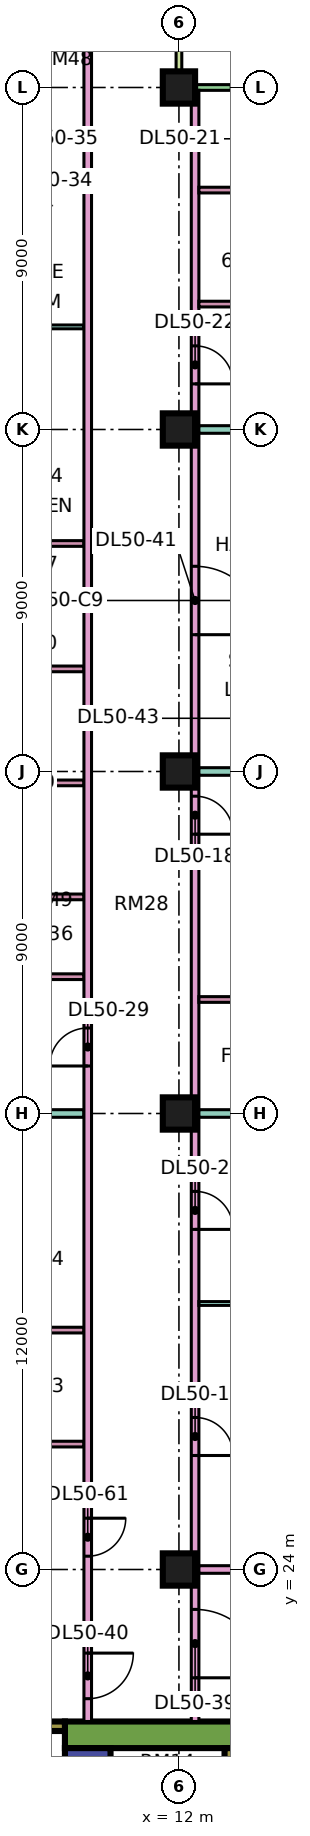
"""IFC4 building model, lengths in metres.
Left out: names, types, materials, properties, quantities, classifications, styles, units other than length and angle.
Written with IfcOpenShell. Run it as: python <this file> out.ifc"""

import sys

from ifc_helpers import new_model, si_unit, direction, frame, frame_2d, origin, origin_2d, place, context, subcontext, project, spatial, rectangle, extrude, element, fill, save


model = new_model("IFC4")
c1 = context("Model", 3, precision=1e-05, world=origin(), true_north=direction((0.0, 1.0)))
c2 = subcontext(c1, "Body", "Model", "MODEL_VIEW")
j1 = project(units=[si_unit("LENGTHUNIT", "METRE"), si_unit("PLANEANGLEUNIT", "RADIAN")], contexts=[c1])
p1 = place(None, origin())
s1 = spatial("IfcSite", under=j1, at=p1, CompositionType="ELEMENT")
p2 = place(p1, origin())
s2 = spatial("IfcBuilding", under=s1, at=p2, CompositionType="ELEMENT")
p3 = place(p2, frame((0.0, 0.0, 215.4)))
s3 = spatial("IfcBuildingStorey", under=s2, at=p3, CompositionType="ELEMENT", Elevation=215.4)
for number, where, z_axis, x_axis in (
    (1, (12.0, 24.0, 0.0), (0.0, 0.0, 1.0), (1.0, 0.0, 0.0)),
    (2, (12.0, 36.0, 0.0), (0.0, 0.0, 1.0), (1.0, 0.0, 0.0)),
    (3, (12.0, 45.0, 0.0), (0.0, 0.0, 1.0), (1.0, 0.0, 0.0)),
    (4, (12.0, 54.0, 0.0), (0.0, 0.0, 1.0), (1.0, 0.0, 0.0)),
    (5, (12.0, 63.0, 0.0), (0.0, 0.0, 1.0), (1.0, 0.0, 0.0)),
):
    element("IfcColumn", number, at=place(p3, frame(where, z_axis=z_axis, x_axis=x_axis)), inside=s3, PredefinedType="COLUMN", context=c2, shape_type="SweptSolid", body=[
        extrude(rectangle(XDim=0.85, YDim=0.85, at=origin_2d()), origin(), (0.0, 0.0, 1.0), 3.75),
    ])
p4 = place(p3, frame((9.0, 19.65, 0.0), z_axis=(0.0, 0.0, 1.0), x_axis=(1.0, 0.0, 0.0)))
e6 = element("IfcWall", 6, at=p4, inside=s3, PredefinedType="SHEAR", context=c2, shape_type="SweptSolid", body=[
    extrude(rectangle(XDim=25.0, YDim=0.7, at=frame_2d((12.5, 0.0))), origin(), (0.0, 0.0, 1.0), 3.75),
])
p5 = place(p4, frame((19.1, 0.0, 0.0)))
e7 = element("IfcOpeningElement", 7, at=p5, cuts=e6, PredefinedType="OPENING", context=c2, shape_type="SweptSolid", body=[
    extrude(rectangle(XDim=1.8, YDim=2.4, at=frame_2d((0.9, 1.2))), frame((0.0, 0.36, 0.0), z_axis=(0.0, -1.0, 0.0), x_axis=(1.0, 0.0, 0.0)), (0.0, 0.0, 1.0), 0.72),
])
p6 = place(p3, frame((9.6, 7.7, 0.0), z_axis=(0.0, 0.0, 1.0), x_axis=(0.0, 1.0, 0.0)))
e8 = element("IfcWall", 8, at=p6, inside=s3, PredefinedType="SHEAR", context=c2, shape_type="SweptSolid", body=[
    extrude(rectangle(XDim=11.6, YDim=1.2, at=frame_2d((5.8, 0.0))), origin(), (0.0, 0.0, 1.0), 3.75),
])
p7 = place(p6, frame((4.175, 0.0, 0.0)))
e9 = element("IfcOpeningElement", 9, at=p7, cuts=e8, PredefinedType="OPENING", context=c2, shape_type="SweptSolid", body=[
    extrude(rectangle(XDim=1.1, YDim=2.2, at=frame_2d((0.55, 1.1))), frame((0.0, 0.61, 0.0), z_axis=(0.0, -1.0, 0.0), x_axis=(1.0, 0.0, 0.0)), (0.0, 0.0, 1.0), 1.22),
])
p8 = place(p6, frame((6.675, 0.0, 0.0)))
e10 = element("IfcOpeningElement", 10, at=p8, cuts=e8, PredefinedType="OPENING", context=c2, shape_type="SweptSolid", body=[
    extrude(rectangle(XDim=1.1, YDim=2.2, at=frame_2d((0.55, 1.1))), frame((0.0, 0.61, 0.0), z_axis=(0.0, -1.0, 0.0), x_axis=(1.0, 0.0, 0.0)), (0.0, 0.0, 1.0), 1.22),
])
p9 = place(p6, frame((9.55, 0.0, 0.0)))
e11 = element("IfcOpeningElement", 11, at=p9, cuts=e8, PredefinedType="OPENING", context=c2, shape_type="SweptSolid", body=[
    extrude(rectangle(XDim=1.1, YDim=2.2, at=frame_2d((0.55, 1.1))), frame((0.0, 0.61, 0.0), z_axis=(0.0, -1.0, 0.0), x_axis=(1.0, 0.0, 0.0)), (0.0, 0.0, 1.0), 1.22),
])
p10 = place(p6, frame((1.85, 0.0, 0.0)))
e12 = element("IfcOpeningElement", 12, at=p10, cuts=e8, PredefinedType="OPENING", context=c2, shape_type="SweptSolid", body=[
    extrude(rectangle(XDim=0.9, YDim=2.1, at=frame_2d((0.45, 1.05))), frame((0.0, 0.61, 0.0), z_axis=(0.0, -1.0, 0.0), x_axis=(1.0, 0.0, 0.0)), (0.0, 0.0, 1.0), 1.22),
])
p11 = place(p3, frame((13.325, 7.7, 0.0), z_axis=(0.0, 0.0, 1.0), x_axis=(0.0, 1.0, 0.0)))
e13 = element("IfcWall", 13, at=p11, inside=s3, PredefinedType="SHEAR", context=c2, shape_type="SweptSolid", body=[
    extrude(rectangle(XDim=11.6, YDim=0.25, at=frame_2d((5.8, 0.0))), origin(), (0.0, 0.0, 1.0), 3.75),
])
p12 = place(p3, frame((2.1, 19.875, 0.0), z_axis=(0.0, 0.0, 1.0), x_axis=(1.0, 0.0, 0.0)))
e14 = element("IfcWall", 14, at=p12, inside=s3, PredefinedType="SHEAR", context=c2, shape_type="SweptSolid", body=[
    extrude(rectangle(XDim=6.9, YDim=0.25, at=frame_2d((3.45, 0.0))), origin(), (0.0, 0.0, 1.0), 3.75),
])
p13 = place(p12, frame((1.175, 0.0, 0.0)))
e15 = element("IfcOpeningElement", 15, at=p13, cuts=e14, PredefinedType="OPENING", context=c2, shape_type="SweptSolid", body=[
    extrude(rectangle(XDim=1.1, YDim=2.2, at=frame_2d((0.55, 1.1))), frame((0.0, 0.135, 0.0), z_axis=(0.0, -1.0, 0.0), x_axis=(1.0, 0.0, 0.0)), (0.0, 0.0, 1.0), 0.27),
])
p14 = place(p12, frame((4.6, 0.0, 0.0)))
e16 = element("IfcOpeningElement", 16, at=p14, cuts=e14, PredefinedType="OPENING", context=c2, shape_type="SweptSolid", body=[
    extrude(rectangle(XDim=1.2, YDim=2.2, at=frame_2d((0.6, 1.1))), frame((0.0, 0.135, 0.0), z_axis=(0.0, -1.0, 0.0), x_axis=(1.0, 0.0, 0.0)), (0.0, 0.0, 1.0), 0.27),
])
p15 = place(p3, frame((22.425, 63.0, 0.0), z_axis=(0.0, 0.0, 1.0), x_axis=(-1.0, 0.0, 0.0)))
e17 = element("IfcWall", 17, at=p15, inside=s3, PredefinedType="SOLIDWALL", context=c2, shape_type="SweptSolid", body=[
    extrude(rectangle(XDim=10.35, YDim=0.15, at=frame_2d((5.175, 0.0))), origin(), (0.0, 0.0, 1.0), 3.35),
])
p16 = place(p15, frame((1.1, 0.0, 0.0)))
e18 = element("IfcOpeningElement", 18, at=p16, cuts=e17, PredefinedType="OPENING", context=c2, shape_type="SweptSolid", body=[
    extrude(rectangle(XDim=1.8, YDim=2.4, at=frame_2d((0.9, 1.2))), frame((0.0, 0.085, 0.0), z_axis=(0.0, -1.0, 0.0), x_axis=(1.0, 0.0, 0.0)), (0.0, 0.0, 1.0), 0.17),
])
p17 = place(p15, frame((6.05, 0.0, 0.45)))
e19 = element("IfcOpeningElement", 19, at=p17, cuts=e17, PredefinedType="OPENING", context=c2, shape_type="SweptSolid", body=[
    extrude(rectangle(XDim=3.0, YDim=2.4, at=frame_2d((1.5, 1.2))), frame((0.0, 0.085, 0.0), z_axis=(0.0, -1.0, 0.0), x_axis=(1.0, 0.0, 0.0)), (0.0, 0.0, 1.0), 0.17),
])
p18 = place(p3, frame((12.0, 64.5, 0.0), z_axis=(0.0, 0.0, 1.0), x_axis=(0.0, -1.0, 0.0)))
e20 = element("IfcWall", 20, at=p18, inside=s3, PredefinedType="SOLIDWALL", context=c2, shape_type="SweptSolid", body=[
    extrude(rectangle(XDim=1.5, YDim=0.15, at=frame_2d((0.75, 0.0))), origin(), (0.0, 0.0, 1.0), 3.35),
])
p19 = place(p3, frame((0.074, 22.4, 0.0), z_axis=(0.0, 0.0, 1.0), x_axis=(1.0, 0.0, 0.0)))
e21 = element("IfcWall", 21, at=p19, inside=s3, PredefinedType="PARTITIONING", context=c2, shape_type="SweptSolid", body=[
    extrude(rectangle(XDim=9.426, YDim=0.2, at=frame_2d((4.713, 0.0))), origin(), (0.0, 0.0, 1.0), 3.35),
])
p20 = place(p3, frame((5.65, 36.0, 0.0), z_axis=(0.0, 0.0, 1.0), x_axis=(1.0, 0.0, 0.0)))
e22 = element("IfcWall", 22, at=p20, inside=s3, PredefinedType="PARTITIONING", context=c2, shape_type="SweptSolid", body=[
    extrude(rectangle(XDim=3.85, YDim=0.2, at=frame_2d((1.925, 0.0))), origin(), (0.0, 0.0, 1.0), 3.35),
])
p21 = place(p3, frame((6.675, 39.6, 0.0), z_axis=(0.0, 0.0, 1.0), x_axis=(1.0, 0.0, 0.0)))
e23 = element("IfcWall", 23, at=p21, inside=s3, PredefinedType="PARTITIONING", context=c2, shape_type="SweptSolid", body=[
    extrude(rectangle(XDim=2.825, YDim=0.15, at=frame_2d((1.413, 0.0))), origin(), (0.0, 0.0, 1.0), 3.35),
])
p22 = place(p21, frame((1.075, 0.0, 0.0)))
e24 = element("IfcOpeningElement", 24, at=p22, cuts=e23, PredefinedType="OPENING", context=c2, shape_type="SweptSolid", body=[
    extrude(rectangle(XDim=0.8, YDim=2.1, at=frame_2d((0.4, 1.05))), frame((0.0, 0.085, 0.0), z_axis=(0.0, -1.0, 0.0), x_axis=(1.0, 0.0, 0.0)), (0.0, 0.0, 1.0), 0.17),
])
for number, where, z_axis, x_axis in (
    (25, (6.675, 41.7, 0.0), (0.0, 0.0, 1.0), (1.0, 0.0, 0.0)),
    (26, (6.675, 44.7, 0.0), (0.0, 0.0, 1.0), (1.0, 0.0, 0.0)),
    (27, (6.675, 47.7, 0.0), (0.0, 0.0, 1.0), (1.0, 0.0, 0.0)),
    (28, (6.675, 51.0, 0.0), (0.0, 0.0, 1.0), (1.0, 0.0, 0.0)),
):
    element("IfcWall", number, at=place(p3, frame(where, z_axis=z_axis, x_axis=x_axis)), inside=s3, PredefinedType="PARTITIONING", context=c2, shape_type="SweptSolid", body=[
        extrude(rectangle(XDim=2.825, YDim=0.15, at=frame_2d((1.413, 0.0))), origin(), (0.0, 0.0, 1.0), 3.35),
    ])
for number, where, z_axis, x_axis in (
    (29, (6.675, 56.7, 0.0), (0.0, 0.0, 1.0), (1.0, 0.0, 0.0)),
    (30, (6.675, 60.3, 0.0), (0.0, 0.0, 1.0), (1.0, 0.0, 0.0)),
):
    element("IfcWall", number, at=place(p3, frame(where, z_axis=z_axis, x_axis=x_axis)), inside=s3, PredefinedType="PARTITIONING", context=c2, shape_type="SweptSolid", body=[
        extrude(rectangle(XDim=2.825, YDim=0.1, at=frame_2d((1.413, 0.0))), origin(), (0.0, 0.0, 1.0), 3.35),
    ])
for number, where, z_axis, x_axis in (
    (31, (6.975, 27.3, 0.0), (0.0, 0.0, 1.0), (1.0, 0.0, 0.0)),
    (32, (6.975, 30.3, 0.0), (0.0, 0.0, 1.0), (1.0, 0.0, 0.0)),
):
    element("IfcWall", number, at=place(p3, frame(where, z_axis=z_axis, x_axis=x_axis)), inside=s3, PredefinedType="PARTITIONING", context=c2, shape_type="SweptSolid", body=[
        extrude(rectangle(XDim=2.525, YDim=0.15, at=frame_2d((1.262, 0.0))), origin(), (0.0, 0.0, 1.0), 3.35),
    ])
p23 = place(p3, frame((9.6, 20.0, 0.0), z_axis=(0.0, 0.0, 1.0), x_axis=(0.0, 1.0, 0.0)))
e33 = element("IfcWall", 33, at=p23, inside=s3, PredefinedType="PARTITIONING", context=c2, shape_type="SweptSolid", body=[
    extrude(rectangle(XDim=44.35, YDim=0.2, at=frame_2d((22.175, 0.0))), origin(), (0.0, 0.0, 1.0), 3.35),
])
p24 = place(p23, frame((17.25, 0.0, 0.0)))
e34 = element("IfcOpeningElement", 34, at=p24, cuts=e33, PredefinedType="OPENING", context=c2, shape_type="SweptSolid", body=[
    extrude(rectangle(XDim=1.0, YDim=2.1, at=frame_2d((0.5, 1.05))), frame((0.0, 0.11, 0.0), z_axis=(0.0, -1.0, 0.0), x_axis=(1.0, 0.0, 0.0)), (0.0, 0.0, 1.0), 0.22),
])
p25 = place(p23, frame((0.6, 0.0, 0.0)))
e35 = element("IfcOpeningElement", 35, at=p25, cuts=e33, PredefinedType="OPENING", context=c2, shape_type="SweptSolid", body=[
    extrude(rectangle(XDim=1.2, YDim=2.1, at=frame_2d((0.6, 1.05))), frame((0.0, 0.11, 0.0), z_axis=(0.0, -1.0, 0.0), x_axis=(1.0, 0.0, 0.0)), (0.0, 0.0, 1.0), 0.22),
])
p26 = place(p23, frame((4.35, 0.0, 0.0)))
e36 = element("IfcOpeningElement", 36, at=p26, cuts=e33, PredefinedType="OPENING", context=c2, shape_type="SweptSolid", body=[
    extrude(rectangle(XDim=1.0, YDim=2.1, at=frame_2d((0.5, 1.05))), frame((0.0, 0.11, 0.0), z_axis=(0.0, -1.0, 0.0), x_axis=(1.0, 0.0, 0.0)), (0.0, 0.0, 1.0), 0.22),
])
p27 = place(p3, frame((12.425, 20.0, 0.0), z_axis=(0.0, 0.0, 1.0), x_axis=(0.0, 1.0, 0.0)))
e37 = element("IfcWall", 37, at=p27, inside=s3, PredefinedType="PARTITIONING", context=c2, shape_type="SweptSolid", body=[
    extrude(rectangle(XDim=42.926, YDim=0.2, at=frame_2d((21.463, 0.0))), origin(), (0.0, 0.0, 1.0), 3.35),
])
p28 = place(p27, frame((7.0, 0.0, 0.0)))
e38 = element("IfcOpeningElement", 38, at=p28, cuts=e37, PredefinedType="OPENING", context=c2, shape_type="SweptSolid", body=[
    extrude(rectangle(XDim=1.0, YDim=2.1, at=frame_2d((0.5, 1.05))), frame((0.0, 0.11, 0.0), z_axis=(0.0, -1.0, 0.0), x_axis=(1.0, 0.0, 0.0)), (0.0, 0.0, 1.0), 0.22),
])
p29 = place(p27, frame((12.95, 0.0, 0.0)))
e39 = element("IfcOpeningElement", 39, at=p29, cuts=e37, PredefinedType="OPENING", context=c2, shape_type="SweptSolid", body=[
    extrude(rectangle(XDim=1.0, YDim=2.1, at=frame_2d((0.5, 1.05))), frame((0.0, 0.11, 0.0), z_axis=(0.0, -1.0, 0.0), x_axis=(1.0, 0.0, 0.0)), (0.0, 0.0, 1.0), 0.22),
])
p30 = place(p27, frame((23.35, 0.0, 0.0)))
e40 = element("IfcOpeningElement", 40, at=p30, cuts=e37, PredefinedType="OPENING", context=c2, shape_type="SweptSolid", body=[
    extrude(rectangle(XDim=1.0, YDim=2.1, at=frame_2d((0.5, 1.05))), frame((0.0, 0.11, 0.0), z_axis=(0.0, -1.0, 0.0), x_axis=(1.0, 0.0, 0.0)), (0.0, 0.0, 1.0), 0.22),
])
p31 = place(p27, frame((35.2, 0.0, 0.0)))
e41 = element("IfcOpeningElement", 41, at=p31, cuts=e37, PredefinedType="OPENING", context=c2, shape_type="SweptSolid", body=[
    extrude(rectangle(XDim=1.0, YDim=2.1, at=frame_2d((0.5, 1.05))), frame((0.0, 0.11, 0.0), z_axis=(0.0, -1.0, 0.0), x_axis=(1.0, 0.0, 0.0)), (0.0, 0.0, 1.0), 0.22),
])
p32 = place(p27, frame((1.15, 0.0, 0.0)))
e42 = element("IfcOpeningElement", 42, at=p32, cuts=e37, PredefinedType="OPENING", context=c2, shape_type="SweptSolid", body=[
    extrude(rectangle(XDim=1.8, YDim=2.1, at=frame_2d((0.9, 1.05))), frame((0.0, 0.11, 0.0), z_axis=(0.0, -1.0, 0.0), x_axis=(1.0, 0.0, 0.0)), (0.0, 0.0, 1.0), 0.22),
])
p33 = place(p27, frame((28.6, 0.0, 0.0)))
e43 = element("IfcOpeningElement", 43, at=p33, cuts=e37, PredefinedType="OPENING", context=c2, shape_type="SweptSolid", body=[
    extrude(rectangle(XDim=1.8, YDim=2.1, at=frame_2d((0.9, 1.05))), frame((0.0, 0.11, 0.0), z_axis=(0.0, -1.0, 0.0), x_axis=(1.0, 0.0, 0.0)), (0.0, 0.0, 1.0), 0.22),
])
p34 = place(p3, frame((12.525, 24.0, 0.0), z_axis=(0.0, 0.0, 1.0), x_axis=(1.0, 0.0, 0.0)))
e44 = element("IfcWall", 44, at=p34, inside=s3, PredefinedType="PARTITIONING", context=c2, shape_type="SweptSolid", body=[
    extrude(rectangle(XDim=8.975, YDim=0.2, at=frame_2d((4.488, 0.0))), origin(), (0.0, 0.0, 1.0), 3.35),
])
p35 = place(p3, frame((12.525, 31.0, 0.0), z_axis=(0.0, 0.0, 1.0), x_axis=(1.0, 0.0, 0.0)))
e45 = element("IfcWall", 45, at=p35, inside=s3, PredefinedType="PARTITIONING", context=c2, shape_type="SweptSolid", body=[
    extrude(rectangle(XDim=8.975, YDim=0.1, at=frame_2d((4.488, 0.0))), origin(), (0.0, 0.0, 1.0), 3.35),
])
p36 = place(p3, frame((12.525, 36.0, 0.0), z_axis=(0.0, 0.0, 1.0), x_axis=(1.0, 0.0, 0.0)))
e46 = element("IfcWall", 46, at=p36, inside=s3, PredefinedType="PARTITIONING", context=c2, shape_type="SweptSolid", body=[
    extrude(rectangle(XDim=11.475, YDim=0.2, at=frame_2d((5.738, 0.0))), origin(), (0.0, 0.0, 1.0), 3.35),
])
for number, where, z_axis, x_axis in (
    (47, (12.525, 39.0, 0.0), (0.0, 0.0, 1.0), (1.0, 0.0, 0.0)),
    (48, (12.525, 42.6, 0.0), (0.0, 0.0, 1.0), (1.0, 0.0, 0.0)),
):
    element("IfcWall", number, at=place(p3, frame(where, z_axis=z_axis, x_axis=x_axis)), inside=s3, PredefinedType="PARTITIONING", context=c2, shape_type="SweptSolid", body=[
        extrude(rectangle(XDim=5.225, YDim=0.15, at=frame_2d((2.613, 0.0))), origin(), (0.0, 0.0, 1.0), 3.35),
    ])
p37 = place(p3, frame((12.525, 45.0, 0.0), z_axis=(0.0, 0.0, 1.0), x_axis=(1.0, 0.0, 0.0)))
e49 = element("IfcWall", 49, at=p37, inside=s3, PredefinedType="PARTITIONING", context=c2, shape_type="SweptSolid", body=[
    extrude(rectangle(XDim=11.401, YDim=0.2, at=frame_2d((5.701, 0.0))), origin(), (0.0, 0.0, 1.0), 3.35),
])
p38 = place(p3, frame((12.525, 54.0, 0.0), z_axis=(0.0, 0.0, 1.0), x_axis=(1.0, 0.0, 0.0)))
e50 = element("IfcWall", 50, at=p38, inside=s3, PredefinedType="PARTITIONING", context=c2, shape_type="SweptSolid", body=[
    extrude(rectangle(XDim=11.475, YDim=0.2, at=frame_2d((5.738, 0.0))), origin(), (0.0, 0.0, 1.0), 3.35),
])
for number, where, z_axis, x_axis in (
    (51, (12.525, 57.3, 0.0), (0.0, 0.0, 1.0), (1.0, 0.0, 0.0)),
    (52, (12.525, 60.3, 0.0), (0.0, 0.0, 1.0), (1.0, 0.0, 0.0)),
):
    element("IfcWall", number, at=place(p3, frame(where, z_axis=z_axis, x_axis=x_axis)), inside=s3, PredefinedType="PARTITIONING", context=c2, shape_type="SweptSolid", body=[
        extrude(rectangle(XDim=4.625, YDim=0.15, at=frame_2d((2.312, 0.0))), origin(), (0.0, 0.0, 1.0), 3.35),
    ])
p39 = place(p28, frame((1.0, 0.0, 0.0), z_axis=(0.0, 0.0, 1.0), x_axis=(-1.0, 0.0, 0.0)))
e53 = element("IfcDoor", 53, at=p39, inside=s3, OperationType="SINGLE_SWING_LEFT", PredefinedType="DOOR", context=c2, shape_type="SweptSolid", body=[
    extrude(rectangle(XDim=1.0, YDim=2.1, at=frame_2d((0.5, 1.05))), frame((0.0, 0.025, 0.0), z_axis=(0.0, -1.0, 0.0), x_axis=(1.0, 0.0, 0.0)), (0.0, 0.0, 1.0), 0.05),
])
fill(e38, e53)
p40 = place(p29, frame((1.0, 0.0, 0.0), z_axis=(0.0, 0.0, 1.0), x_axis=(-1.0, 0.0, 0.0)))
e54 = element("IfcDoor", 54, at=p40, inside=s3, OperationType="SINGLE_SWING_LEFT", PredefinedType="DOOR", context=c2, shape_type="SweptSolid", body=[
    extrude(rectangle(XDim=1.0, YDim=2.1, at=frame_2d((0.5, 1.05))), frame((0.0, 0.025, 0.0), z_axis=(0.0, -1.0, 0.0), x_axis=(1.0, 0.0, 0.0)), (0.0, 0.0, 1.0), 0.05),
])
fill(e39, e54)
p41 = place(p30, frame((1.0, 0.0, 0.0), z_axis=(0.0, 0.0, 1.0), x_axis=(-1.0, 0.0, 0.0)))
e55 = element("IfcDoor", 55, at=p41, inside=s3, OperationType="SINGLE_SWING_LEFT", PredefinedType="DOOR", context=c2, shape_type="SweptSolid", body=[
    extrude(rectangle(XDim=1.0, YDim=2.1, at=frame_2d((0.5, 1.05))), frame((0.0, 0.025, 0.0), z_axis=(0.0, -1.0, 0.0), x_axis=(1.0, 0.0, 0.0)), (0.0, 0.0, 1.0), 0.05),
])
fill(e40, e55)
p42 = place(p31, frame((1.0, 0.0, 0.0), z_axis=(0.0, 0.0, 1.0), x_axis=(-1.0, 0.0, 0.0)))
e56 = element("IfcDoor", 56, at=p42, inside=s3, OperationType="SINGLE_SWING_LEFT", PredefinedType="DOOR", context=c2, shape_type="SweptSolid", body=[
    extrude(rectangle(XDim=1.0, YDim=2.1, at=frame_2d((0.5, 1.05))), frame((0.0, 0.025, 0.0), z_axis=(0.0, -1.0, 0.0), x_axis=(1.0, 0.0, 0.0)), (0.0, 0.0, 1.0), 0.05),
])
fill(e41, e56)
p43 = place(p24, origin())
e57 = element("IfcDoor", 57, at=p43, inside=s3, OperationType="SINGLE_SWING_LEFT", PredefinedType="DOOR", context=c2, shape_type="SweptSolid", body=[
    extrude(rectangle(XDim=1.0, YDim=2.1, at=frame_2d((0.5, 1.05))), frame((0.0, 0.025, 0.0), z_axis=(0.0, -1.0, 0.0), x_axis=(1.0, 0.0, 0.0)), (0.0, 0.0, 1.0), 0.05),
])
fill(e34, e57)
p44 = place(p32, frame((1.8, 0.0, 0.0), z_axis=(0.0, 0.0, 1.0), x_axis=(-1.0, 0.0, 0.0)))
e58 = element("IfcDoor", 58, at=p44, inside=s3, OperationType="DOUBLE_DOOR_SINGLE_SWING", PredefinedType="DOOR", context=c2, shape_type="SweptSolid", body=[
    extrude(rectangle(XDim=1.8, YDim=2.1, at=frame_2d((0.9, 1.05))), frame((0.0, 0.025, 0.0), z_axis=(0.0, -1.0, 0.0), x_axis=(1.0, 0.0, 0.0)), (0.0, 0.0, 1.0), 0.05),
])
fill(e42, e58)
p45 = place(p25, origin())
e59 = element("IfcDoor", 59, at=p45, inside=s3, OperationType="SINGLE_SWING_RIGHT", PredefinedType="DOOR", context=c2, shape_type="SweptSolid", body=[
    extrude(rectangle(XDim=1.2, YDim=2.1, at=frame_2d((0.6, 1.05))), frame((0.0, 0.025, 0.0), z_axis=(0.0, -1.0, 0.0), x_axis=(1.0, 0.0, 0.0)), (0.0, 0.0, 1.0), 0.05),
])
fill(e35, e59)
p46 = place(p33, frame((1.8, 0.0, 0.0), z_axis=(0.0, 0.0, 1.0), x_axis=(-1.0, 0.0, 0.0)))
e60 = element("IfcDoor", 60, at=p46, inside=s3, OperationType="DOUBLE_DOOR_SINGLE_SWING", PredefinedType="DOOR", context=c2, shape_type="SweptSolid", body=[
    extrude(rectangle(XDim=1.8, YDim=2.1, at=frame_2d((0.9, 1.05))), frame((0.0, 0.025, 0.0), z_axis=(0.0, -1.0, 0.0), x_axis=(1.0, 0.0, 0.0)), (0.0, 0.0, 1.0), 0.05),
])
fill(e43, e60)
p47 = place(p26, origin())
e61 = element("IfcDoor", 61, at=p47, inside=s3, OperationType="SINGLE_SWING_RIGHT", PredefinedType="DOOR", context=c2, shape_type="SweptSolid", body=[
    extrude(rectangle(XDim=1.0, YDim=2.1, at=frame_2d((0.5, 1.05))), frame((0.0, 0.025, 0.0), z_axis=(0.0, -1.0, 0.0), x_axis=(1.0, 0.0, 0.0)), (0.0, 0.0, 1.0), 0.05),
])
fill(e36, e61)
save(model, sys.argv[1])
